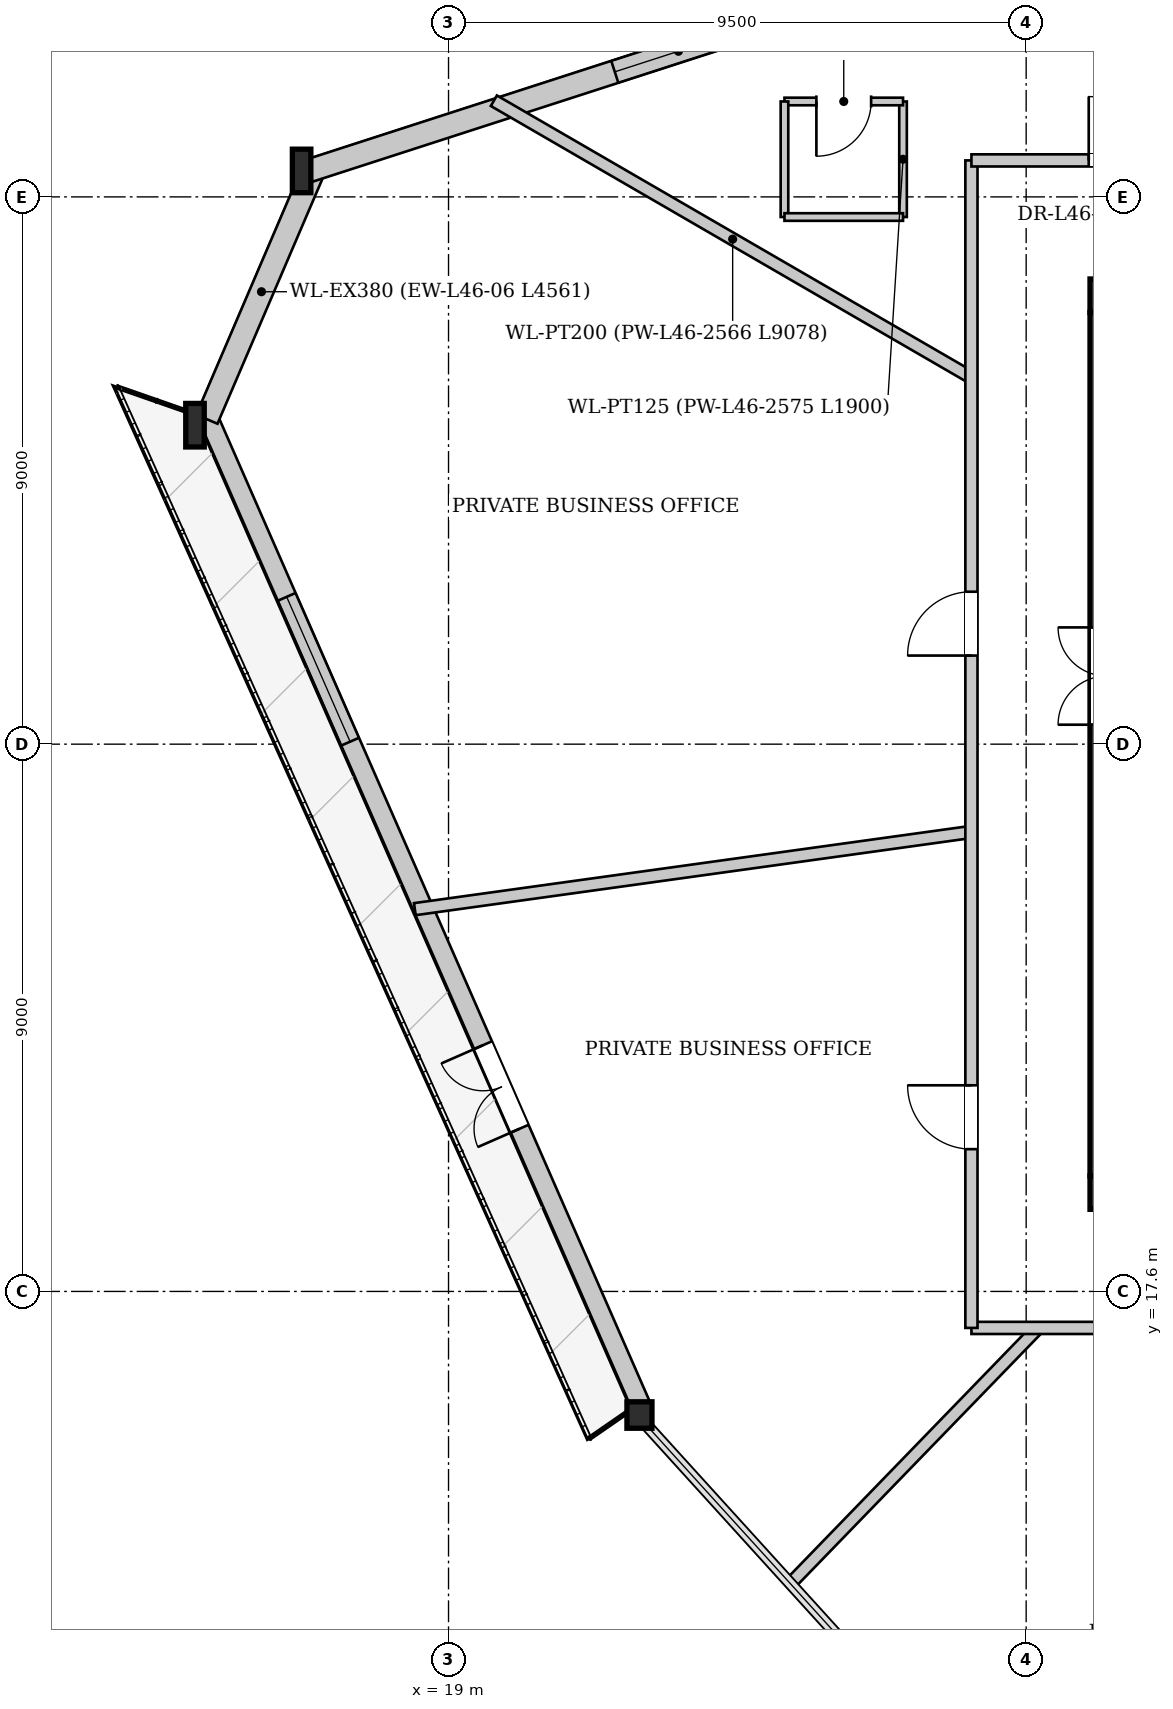
"""IFC4 building model, lengths in metres.
Left out: names, types, materials, properties, quantities, classifications, styles, units other than length and angle.
Written with IfcOpenShell. Run it as: python <this file> out.ifc"""

import sys

from ifc_helpers import new_model, si_unit, direction, frame, frame_2d, origin, origin_2d, place, context, subcontext, project, spatial, rectangle, i_section, extrude, source, transform, mapped, element, fill, save


model = new_model("IFC4")
c1 = context("Model", 3, precision=1e-05, world=origin(), true_north=direction((0.0, 1.0)))
c2 = subcontext(c1, "Body", "Model", "MODEL_VIEW")
j1 = project(units=[si_unit("LENGTHUNIT", "METRE"), si_unit("PLANEANGLEUNIT", "RADIAN")], contexts=[c1])
p1 = place(None, origin())
s1 = spatial("IfcSite", under=j1, at=p1, CompositionType="ELEMENT")
p2 = place(p1, origin())
s2 = spatial("IfcBuilding", under=s1, at=p2, CompositionType="ELEMENT")
p3 = place(p2, frame((0.0, 0.0, 175.0)))
s3 = spatial("IfcBuildingStorey", under=s2, at=p3, CompositionType="ELEMENT", Elevation=175.0)
m1 = source(origin(), c2, "Body", "SweptSolid", [
    extrude(i_section(OverallWidth=0.304, OverallDepth=0.716, WebThickness=0.021, FlangeThickness=0.04, at=origin_2d()), origin(), (0.0, 0.0, 1.0), 3.407),
])
p4 = place(p3, frame((16.647, 36.211, 0.0), z_axis=(-0.037258162813, -0.108191972785, 0.993431591167), x_axis=(0.945505987417, -0.325604710898, 0.0)))
e1 = element("IfcColumn", 1, at=p4, inside=s3, PredefinedType="COLUMN", context=c2, shape_type="MappedRepresentation", body=[
    mapped(m1, transform((0.0, 0.0, 0.0), x_axis=(1.0, 0.0, 0.0), y_axis=(0.0, 1.0, 0.0), z_axis=(0.0, 0.0, 1.0), scale=1.0)),
])
m2 = source(origin(), c2, "Body", "SweptSolid", [
    extrude(i_section(OverallWidth=0.304, OverallDepth=0.716, WebThickness=0.021, FlangeThickness=0.04, at=origin_2d()), origin(), (0.0, 0.0, 1.0), 3.403),
])
p5 = place(p3, frame((14.851, 32.019, 0.0), z_axis=(-0.012052737476, -0.102017813637, 0.994709554202), x_axis=(0.993093280281, -0.117327476151, 0.0)))
e2 = element("IfcColumn", 2, at=p5, inside=s3, PredefinedType="COLUMN", context=c2, shape_type="MappedRepresentation", body=[
    mapped(m2, transform((0.0, 0.0, 0.0), x_axis=(1.0, 0.0, 0.0), y_axis=(0.0, 1.0, 0.0), z_axis=(0.0, 0.0, 1.0), scale=1.0)),
])
m3 = source(origin(), c2, "Body", "SweptSolid", [
    extrude(i_section(OverallWidth=0.412, OverallDepth=0.435, WebThickness=0.031, FlangeThickness=0.05, at=origin_2d()), origin(), (0.0, 0.0, 1.0), 3.4),
])
p6 = place(p3, frame((22.014, 15.666, 0.0), z_axis=(0.073960071972, -0.057731939675, 0.995588735822), x_axis=(0.615317254513, 0.788279567348, 0.0)))
e3 = element("IfcColumn", 3, at=p6, inside=s3, PredefinedType="COLUMN", context=c2, shape_type="MappedRepresentation", body=[
    mapped(m3, transform((0.0, 0.0, 0.0), x_axis=(1.0, 0.0, 0.0), y_axis=(0.0, 1.0, 0.0), z_axis=(0.0, 0.0, 1.0), scale=1.0)),
])
p7 = place(p3, frame((22.161, 15.73, 0.0), z_axis=(0.0, 0.0, 1.0), x_axis=(-0.401254224354, 0.915966728347, 0.0)))
e4 = element("IfcWall", 4, at=p7, inside=s3, PredefinedType="SOLIDWALL", context=c2, shape_type="SweptSolid", body=[
    extrude(rectangle(XDim=17.854, YDim=0.32, at=frame_2d((8.927, 0.0))), origin(), (0.0, 0.0, 1.0), 2.722),
])
p8 = place(p7, frame((4.963, 0.0, 0.0)))
e5 = element("IfcOpeningElement", 5, at=p8, cuts=e4, PredefinedType="OPENING", context=c2, shape_type="SweptSolid", body=[
    extrude(rectangle(XDim=1.5, YDim=2.3, at=frame_2d((0.75, 1.15))), frame((0.0, 0.17, 0.0), z_axis=(0.0, -1.0, 0.0), x_axis=(1.0, 0.0, 0.0)), (0.0, 0.0, 1.0), 0.34),
])
p9 = place(p7, frame((11.912, 0.0, 0.252)))
e6 = element("IfcOpeningElement", 6, at=p9, cuts=e4, PredefinedType="OPENING", context=c2, shape_type="SweptSolid", body=[
    extrude(rectangle(XDim=2.6, YDim=2.35, at=frame_2d((1.3, 1.175))), frame((0.0, 0.17, 0.0), z_axis=(0.0, -1.0, 0.0), x_axis=(1.0, 0.0, 0.0)), (0.0, 0.0, 1.0), 0.34),
])
p10 = place(p3, frame((15.025, 31.944, 0.0), z_axis=(0.0, 0.0, 1.0), x_axis=(0.393899918286, 0.919153335616, 0.0)))
e7 = element("IfcWall", 7, at=p10, inside=s3, PredefinedType="SOLIDWALL", context=c2, shape_type="SweptSolid", body=[
    extrude(rectangle(XDim=4.561, YDim=0.38, at=frame_2d((2.281, 0.0))), origin(), (0.0, 0.0, 1.0), 2.722),
])
p11 = place(p3, frame((16.706, 36.031, 0.0), z_axis=(0.0, 0.0, 1.0), x_axis=(0.95149688804, 0.307658369056, 0.0)))
e8 = element("IfcWall", 8, at=p11, inside=s3, PredefinedType="SOLIDWALL", context=c2, shape_type="SweptSolid", body=[
    extrude(rectangle(XDim=22.803, YDim=0.38, at=frame_2d((11.402, 0.0))), origin(), (0.0, 0.0, 1.0), 2.722),
])
p12 = place(p11, frame((5.285, 0.0, 0.352)))
e9 = element("IfcOpeningElement", 9, at=p12, cuts=e8, PredefinedType="OPENING", context=c2, shape_type="SweptSolid", body=[
    extrude(rectangle(XDim=2.2, YDim=2.25, at=frame_2d((1.1, 1.125))), frame((0.0, 0.2, 0.0), z_axis=(0.0, -1.0, 0.0), x_axis=(1.0, 0.0, 0.0)), (0.0, 0.0, 1.0), 0.4),
])
p13 = place(p11, frame((16.918, 0.0, 0.352)))
e10 = element("IfcOpeningElement", 10, at=p13, cuts=e8, PredefinedType="OPENING", context=c2, shape_type="SweptSolid", body=[
    extrude(rectangle(XDim=2.2, YDim=2.25, at=frame_2d((1.1, 1.125))), frame((0.0, 0.2, 0.0), z_axis=(0.0, -1.0, 0.0), x_axis=(1.0, 0.0, 0.0)), (0.0, 0.0, 1.0), 0.4),
])
p14 = place(p3, frame((46.45, 19.225, 0.0), z_axis=(0.0, 0.0, 1.0), x_axis=(-1.0, 0.0, 0.0)))
e11 = element("IfcWall", 11, at=p14, inside=s3, PredefinedType="SHEAR", context=c2, shape_type="SweptSolid", body=[
    extrude(rectangle(XDim=16.9, YDim=0.55, at=frame_2d((8.45, 0.0))), origin(), (0.0, 0.0, 1.0), 3.33),
])
p15 = place(p14, frame((4.65, 0.0, 0.0)))
e12 = element("IfcOpeningElement", 12, at=p15, cuts=e11, PredefinedType="OPENING", context=c2, shape_type="SweptSolid", body=[
    extrude(rectangle(XDim=1.12, YDim=2.25, at=frame_2d((0.56, 1.125))), frame((0.0, 0.285, 0.0), z_axis=(0.0, -1.0, 0.0), x_axis=(1.0, 0.0, 0.0)), (0.0, 0.0, 1.0), 0.57),
])
p16 = place(p14, frame((11.15, 0.0, 0.0)))
e13 = element("IfcOpeningElement", 13, at=p16, cuts=e11, PredefinedType="OPENING", context=c2, shape_type="SweptSolid", body=[
    extrude(rectangle(XDim=1.12, YDim=2.25, at=frame_2d((0.56, 1.125))), frame((0.0, 0.285, 0.0), z_axis=(0.0, -1.0, 0.0), x_axis=(1.0, 0.0, 0.0)), (0.0, 0.0, 1.0), 0.57),
])
p17 = place(p3, frame((29.825, 19.5, 0.0), z_axis=(0.0, 0.0, 1.0), x_axis=(0.0, 1.0, 0.0)))
e14 = element("IfcWall", 14, at=p17, inside=s3, PredefinedType="SHEAR", context=c2, shape_type="SweptSolid", body=[
    extrude(rectangle(XDim=14.2, YDim=0.55, at=frame_2d((7.1, 0.0))), origin(), (0.0, 0.0, 1.0), 3.33),
])
p18 = place(p17, frame((7.42, 0.0, 0.0)))
e15 = element("IfcOpeningElement", 15, at=p18, cuts=e14, PredefinedType="OPENING", context=c2, shape_type="SweptSolid", body=[
    extrude(rectangle(XDim=1.6, YDim=2.2, at=frame_2d((0.8, 1.1))), frame((0.0, 0.285, 0.0), z_axis=(0.0, -1.0, 0.0), x_axis=(1.0, 0.0, 0.0)), (0.0, 0.0, 1.0), 0.57),
])
p19 = place(p3, frame((29.55, 33.975, 0.0), z_axis=(0.0, 0.0, 1.0), x_axis=(1.0, 0.0, 0.0)))
e16 = element("IfcWall", 16, at=p19, inside=s3, PredefinedType="SHEAR", context=c2, shape_type="SweptSolid", body=[
    extrude(rectangle(XDim=16.9, YDim=0.55, at=frame_2d((8.45, 0.0))), origin(), (0.0, 0.0, 1.0), 3.33),
])
p20 = place(p19, frame((1.55, 0.0, 0.0)))
e17 = element("IfcOpeningElement", 17, at=p20, cuts=e16, PredefinedType="OPENING", context=c2, shape_type="SweptSolid", body=[
    extrude(rectangle(XDim=0.95, YDim=2.1, at=frame_2d((0.475, 1.05))), frame((0.0, 0.285, 0.0), z_axis=(0.0, -1.0, 0.0), x_axis=(1.0, 0.0, 0.0)), (0.0, 0.0, 1.0), 0.57),
])
p21 = place(p19, frame((3.93, 0.0, 0.0)))
e18 = element("IfcOpeningElement", 18, at=p21, cuts=e16, PredefinedType="OPENING", context=c2, shape_type="SweptSolid", body=[
    extrude(rectangle(XDim=1.32, YDim=2.2, at=frame_2d((0.66, 1.1))), frame((0.0, 0.285, 0.0), z_axis=(0.0, -1.0, 0.0), x_axis=(1.0, 0.0, 0.0)), (0.0, 0.0, 1.0), 0.57),
])
p22 = place(p3, frame((27.6, 32.629, 0.0), z_axis=(0.0, 0.0, 1.0), x_axis=(-0.865149978603, 0.501513224674, 0.0)))
e19 = element("IfcWall", 19, at=p22, inside=s3, PredefinedType="PARTITIONING", context=c2, shape_type="SweptSolid", body=[
    extrude(rectangle(XDim=9.078, YDim=0.2, at=frame_2d((4.539, 0.0))), origin(), (0.0, 0.0, 1.0), 3.33),
])
p23 = place(p3, frame((27.6, 25.157, 0.0), z_axis=(0.0, 0.0, 1.0), x_axis=(-0.990508964045, -0.137448143484, 0.0)))
e20 = element("IfcWall", 20, at=p23, inside=s3, PredefinedType="PARTITIONING", context=c2, shape_type="SweptSolid", body=[
    extrude(rectangle(XDim=9.242, YDim=0.2, at=frame_2d((4.621, 0.0))), origin(), (0.0, 0.0, 1.0), 3.33),
])
p24 = place(p3, frame((28.697, 17.0, 0.0), z_axis=(0.0, 0.0, 1.0), x_axis=(-0.695914109274, -0.718125025684, 0.0)))
e21 = element("IfcWall", 21, at=p24, inside=s3, PredefinedType="PARTITIONING", context=c2, shape_type="SweptSolid", body=[
    extrude(rectangle(XDim=5.826, YDim=0.2, at=frame_2d((2.913, 0.0))), origin(), (0.0, 0.0, 1.0), 3.33),
])
p25 = place(p3, frame((26.475, 35.269, 0.0), z_axis=(0.0, 0.0, 1.0), x_axis=(0.0, 1.0, 0.0)))
e22 = element("IfcWall", 22, at=p25, inside=s3, PredefinedType="PARTITIONING", context=c2, shape_type="SweptSolid", body=[
    extrude(rectangle(XDim=1.9, YDim=0.125, at=frame_2d((0.95, 0.0))), origin(), (0.0, 0.0, 1.0), 3.33),
])
p26 = place(p3, frame((26.475, 37.169, 0.0), z_axis=(0.0, 0.0, 1.0), x_axis=(-1.0, 0.0, 0.0)))
e23 = element("IfcWall", 23, at=p26, inside=s3, PredefinedType="PARTITIONING", context=c2, shape_type="SweptSolid", body=[
    extrude(rectangle(XDim=1.95, YDim=0.125, at=frame_2d((0.975, 0.0))), origin(), (0.0, 0.0, 1.0), 3.33),
])
p27 = place(p26, frame((0.525, 0.0, 0.0)))
e24 = element("IfcOpeningElement", 24, at=p27, cuts=e23, PredefinedType="OPENING", context=c2, shape_type="SweptSolid", body=[
    extrude(rectangle(XDim=0.9, YDim=2.1, at=frame_2d((0.45, 1.05))), frame((0.0, 0.073, 0.0), z_axis=(0.0, -1.0, 0.0), x_axis=(1.0, 0.0, 0.0)), (0.0, 0.0, 1.0), 0.145),
])
p28 = place(p3, frame((24.525, 37.169, 0.0), z_axis=(0.0, 0.0, 1.0), x_axis=(0.0, -1.0, 0.0)))
e25 = element("IfcWall", 25, at=p28, inside=s3, PredefinedType="PARTITIONING", context=c2, shape_type="SweptSolid", body=[
    extrude(rectangle(XDim=1.9, YDim=0.125, at=frame_2d((0.95, 0.0))), origin(), (0.0, 0.0, 1.0), 3.33),
])
p29 = place(p3, frame((24.525, 35.269, 0.0), z_axis=(0.0, 0.0, 1.0), x_axis=(1.0, 0.0, 0.0)))
e26 = element("IfcWall", 26, at=p29, inside=s3, PredefinedType="PARTITIONING", context=c2, shape_type="SweptSolid", body=[
    extrude(rectangle(XDim=1.95, YDim=0.125, at=frame_2d((0.975, 0.0))), origin(), (0.0, 0.0, 1.0), 3.33),
])
p30 = place(p3, frame((27.6, 17.0, 0.0), z_axis=(0.0, 0.0, 1.0), x_axis=(1.0, 0.0, 0.0)))
e27 = element("IfcWall", 27, at=p30, inside=s3, PredefinedType="PARTITIONING", context=c2, shape_type="SweptSolid", body=[
    extrude(rectangle(XDim=20.8, YDim=0.2, at=frame_2d((10.4, 0.0))), origin(), (0.0, 0.0, 1.0), 3.33),
])
p31 = place(p30, frame((4.656, 0.0, 0.0)))
e28 = element("IfcOpeningElement", 28, at=p31, cuts=e27, PredefinedType="OPENING", context=c2, shape_type="SweptSolid", body=[
    extrude(rectangle(XDim=1.05, YDim=2.2, at=frame_2d((0.525, 1.1))), frame((0.0, 0.11, 0.0), z_axis=(0.0, -1.0, 0.0), x_axis=(1.0, 0.0, 0.0)), (0.0, 0.0, 1.0), 0.22),
])
p32 = place(p30, frame((11.041, 0.0, 0.0)))
e29 = element("IfcOpeningElement", 29, at=p32, cuts=e27, PredefinedType="OPENING", context=c2, shape_type="SweptSolid", body=[
    extrude(rectangle(XDim=1.05, YDim=2.2, at=frame_2d((0.525, 1.1))), frame((0.0, 0.11, 0.0), z_axis=(0.0, -1.0, 0.0), x_axis=(1.0, 0.0, 0.0)), (0.0, 0.0, 1.0), 0.22),
])
p33 = place(p30, frame((19.45, 0.0, 0.0)))
e30 = element("IfcOpeningElement", 30, at=p33, cuts=e27, PredefinedType="OPENING", context=c2, shape_type="SweptSolid", body=[
    extrude(rectangle(XDim=1.05, YDim=2.2, at=frame_2d((0.525, 1.1))), frame((0.0, 0.11, 0.0), z_axis=(0.0, -1.0, 0.0), x_axis=(1.0, 0.0, 0.0)), (0.0, 0.0, 1.0), 0.22),
])
p34 = place(p3, frame((27.6, 17.0, 0.0), z_axis=(0.0, 0.0, 1.0), x_axis=(0.0, 1.0, 0.0)))
e31 = element("IfcWall", 31, at=p34, inside=s3, PredefinedType="PARTITIONING", context=c2, shape_type="SweptSolid", body=[
    extrude(rectangle(XDim=19.2, YDim=0.2, at=frame_2d((9.6, 0.0))), origin(), (0.0, 0.0, 1.0), 3.33),
])
p35 = place(p34, frame((11.057, 0.0, 0.0)))
e32 = element("IfcOpeningElement", 32, at=p35, cuts=e31, PredefinedType="OPENING", context=c2, shape_type="SweptSolid", body=[
    extrude(rectangle(XDim=1.05, YDim=2.2, at=frame_2d((0.525, 1.1))), frame((0.0, 0.11, 0.0), z_axis=(0.0, -1.0, 0.0), x_axis=(1.0, 0.0, 0.0)), (0.0, 0.0, 1.0), 0.22),
])
p36 = place(p34, frame((2.94, 0.0, 0.0)))
e33 = element("IfcOpeningElement", 33, at=p36, cuts=e31, PredefinedType="OPENING", context=c2, shape_type="SweptSolid", body=[
    extrude(rectangle(XDim=1.05, YDim=2.2, at=frame_2d((0.525, 1.1))), frame((0.0, 0.11, 0.0), z_axis=(0.0, -1.0, 0.0), x_axis=(1.0, 0.0, 0.0)), (0.0, 0.0, 1.0), 0.22),
])
p37 = place(p3, frame((27.6, 36.2, 0.0), z_axis=(0.0, 0.0, 1.0), x_axis=(1.0, 0.0, 0.0)))
e34 = element("IfcWall", 34, at=p37, inside=s3, PredefinedType="PARTITIONING", context=c2, shape_type="SweptSolid", body=[
    extrude(rectangle(XDim=13.4, YDim=0.2, at=frame_2d((6.7, 0.0))), origin(), (0.0, 0.0, 1.0), 3.33),
])
p38 = place(p37, frame((9.415, 0.0, 0.0)))
e35 = element("IfcOpeningElement", 35, at=p38, cuts=e34, PredefinedType="OPENING", context=c2, shape_type="SweptSolid", body=[
    extrude(rectangle(XDim=1.05, YDim=2.2, at=frame_2d((0.525, 1.1))), frame((0.0, 0.11, 0.0), z_axis=(0.0, -1.0, 0.0), x_axis=(1.0, 0.0, 0.0)), (0.0, 0.0, 1.0), 0.22),
])
p39 = place(p37, frame((1.929, 0.0, 0.0)))
e36 = element("IfcOpeningElement", 36, at=p39, cuts=e34, PredefinedType="OPENING", context=c2, shape_type="SweptSolid", body=[
    extrude(rectangle(XDim=1.05, YDim=2.2, at=frame_2d((0.525, 1.1))), frame((0.0, 0.11, 0.0), z_axis=(0.0, -1.0, 0.0), x_axis=(1.0, 0.0, 0.0)), (0.0, 0.0, 1.0), 0.22),
])
m4 = source(origin(), c2, "Body", "SweptSolid", [
    extrude(rectangle(XDim=1.5, YDim=2.3, at=frame_2d((0.75, 1.15))), frame((0.0, 0.025, 0.0), z_axis=(0.0, -1.0, 0.0), x_axis=(1.0, 0.0, 0.0)), (0.0, 0.0, 1.0), 0.05),
])
p40 = place(p8, origin())
e37 = element("IfcDoor", 37, at=p40, inside=s3, OperationType="DOUBLE_DOOR_SINGLE_SWING", PredefinedType="DOOR", context=c2, shape_type="MappedRepresentation", body=[
    mapped(m4, transform((0.0, 0.0, 0.0), x_axis=(1.0, 0.0, 0.0), y_axis=(0.0, 1.0, 0.0), z_axis=(0.0, 0.0, 1.0), scale=1.0)),
])
fill(e5, e37)
m5 = source(origin(), c2, "Body", "SweptSolid", [
    extrude(rectangle(XDim=2.6, YDim=2.35, at=frame_2d((1.3, 1.175))), frame((0.0, 0.03, 0.0), z_axis=(0.0, -1.0, 0.0), x_axis=(1.0, 0.0, 0.0)), (0.0, 0.0, 1.0), 0.06),
])
p41 = place(p9, origin())
e38 = element("IfcWindow", 38, at=p41, inside=s3, PartitioningType="SINGLE_PANEL", PredefinedType="WINDOW", context=c2, shape_type="MappedRepresentation", body=[
    mapped(m5, transform((0.0, 0.0, 0.0), x_axis=(1.0, 0.0, 0.0), y_axis=(0.0, 1.0, 0.0), z_axis=(0.0, 0.0, 1.0), scale=1.0)),
])
fill(e6, e38)
m6 = source(origin(), c2, "Body", "SweptSolid", [
    extrude(rectangle(XDim=2.2, YDim=2.25, at=frame_2d((1.1, 1.125))), frame((0.0, 0.03, 0.0), z_axis=(0.0, -1.0, 0.0), x_axis=(1.0, 0.0, 0.0)), (0.0, 0.0, 1.0), 0.06),
])
p42 = place(p12, origin())
e39 = element("IfcWindow", 39, at=p42, inside=s3, PartitioningType="SINGLE_PANEL", PredefinedType="WINDOW", context=c2, shape_type="MappedRepresentation", body=[
    mapped(m6, transform((0.0, 0.0, 0.0), x_axis=(1.0, 0.0, 0.0), y_axis=(0.0, 1.0, 0.0), z_axis=(0.0, 0.0, 1.0), scale=1.0)),
])
fill(e9, e39)
m7 = source(origin(), c2, "Body", "SweptSolid", [
    extrude(rectangle(XDim=0.9, YDim=2.1, at=frame_2d((0.45, 1.05))), frame((0.0, 0.025, 0.0), z_axis=(0.0, -1.0, 0.0), x_axis=(1.0, 0.0, 0.0)), (0.0, 0.0, 1.0), 0.05),
])
p43 = place(p27, origin())
e40 = element("IfcDoor", 40, at=p43, inside=s3, OperationType="SINGLE_SWING_RIGHT", PredefinedType="DOOR", context=c2, shape_type="MappedRepresentation", body=[
    mapped(m7, transform((0.0, 0.0, 0.0), x_axis=(1.0, 0.0, 0.0), y_axis=(0.0, 1.0, 0.0), z_axis=(0.0, 0.0, 1.0), scale=1.0)),
])
fill(e24, e40)
m8 = source(origin(), c2, "Body", "SweptSolid", [
    extrude(rectangle(XDim=1.05, YDim=2.2, at=frame_2d((0.525, 1.1))), frame((0.0, 0.025, 0.0), z_axis=(0.0, -1.0, 0.0), x_axis=(1.0, 0.0, 0.0)), (0.0, 0.0, 1.0), 0.05),
])
p44 = place(p35, origin())
e41 = element("IfcDoor", 41, at=p44, inside=s3, OperationType="SINGLE_SWING_LEFT", PredefinedType="DOOR", context=c2, shape_type="MappedRepresentation", body=[
    mapped(m8, transform((0.0, 0.0, 0.0), x_axis=(1.0, 0.0, 0.0), y_axis=(0.0, 1.0, 0.0), z_axis=(0.0, 0.0, 1.0), scale=1.0)),
])
fill(e32, e41)
p45 = place(p36, origin())
e42 = element("IfcDoor", 42, at=p45, inside=s3, OperationType="SINGLE_SWING_RIGHT", PredefinedType="DOOR", context=c2, shape_type="MappedRepresentation", body=[
    mapped(m8, transform((0.0, 0.0, 0.0), x_axis=(1.0, 0.0, 0.0), y_axis=(0.0, 1.0, 0.0), z_axis=(0.0, 0.0, 1.0), scale=1.0)),
])
fill(e33, e42)
p46 = place(p39, origin())
e43 = element("IfcDoor", 43, at=p46, inside=s3, OperationType="SINGLE_SWING_LEFT", PredefinedType="DOOR", context=c2, shape_type="MappedRepresentation", body=[
    mapped(m8, transform((0.0, 0.0, 0.0), x_axis=(1.0, 0.0, 0.0), y_axis=(0.0, 1.0, 0.0), z_axis=(0.0, 0.0, 1.0), scale=1.0)),
])
fill(e36, e43)
save(model, sys.argv[1])
